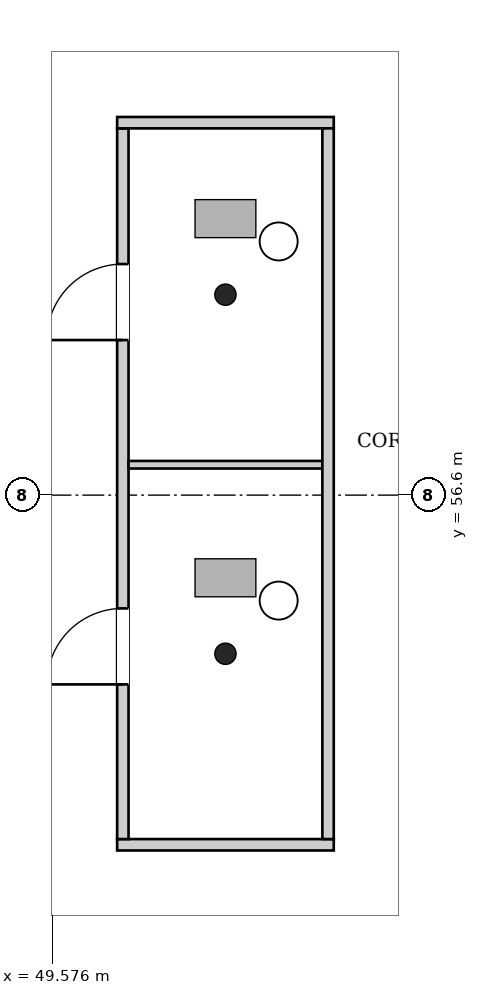
"""IFC4 building model, lengths in metres.
Left out: names, types, materials, properties, quantities, classifications, styles, units other than length and angle.
Written with IfcOpenShell. Run it as: python <this file> out.ifc"""

import sys

from ifc_helpers import new_model, si_unit, direction, frame, frame_2d, origin, place, context, subcontext, project, spatial, rectangle, extrude, element, fill, save


model = new_model("IFC4")
c1 = context("Model", 3, precision=1e-05, world=origin(), true_north=direction((0.0, 1.0)))
c2 = subcontext(c1, "Body", "Model", "MODEL_VIEW")
j1 = project(units=[si_unit("LENGTHUNIT", "METRE"), si_unit("PLANEANGLEUNIT", "RADIAN")], contexts=[c1])
p1 = place(None, origin())
s1 = spatial("IfcSite", under=j1, at=p1, CompositionType="ELEMENT")
p2 = place(p1, origin())
s2 = spatial("IfcBuilding", under=s1, at=p2, CompositionType="ELEMENT")
p3 = place(p2, frame((0.0, 0.0, 14.2)))
s3 = spatial("IfcBuildingStorey", under=s2, at=p3, CompositionType="ELEMENT", Elevation=14.2)
p4 = place(p3, frame((50.425, 52.0, 0.0), z_axis=(0.0, 0.0, 1.0), x_axis=(1.0, 0.0, 0.0)))
e1 = element("IfcWall", 1, at=p4, inside=s3, PredefinedType="PARTITIONING", context=c2, shape_type="SweptSolid", body=[
    extrude(rectangle(XDim=2.85, YDim=0.15, at=frame_2d((1.425, 0.0))), origin(), (0.0, 0.0, 1.0), 7.15),
])
p5 = place(p3, frame((50.5, 52.075, 0.0), z_axis=(0.0, 0.0, 1.0), x_axis=(0.0, 1.0, 0.0)))
e2 = element("IfcWall", 2, at=p5, inside=s3, PredefinedType="PARTITIONING", context=c2, shape_type="SweptSolid", body=[
    extrude(rectangle(XDim=9.35, YDim=0.15, at=frame_2d((4.675, 0.0))), origin(), (0.0, 0.0, 1.0), 7.15),
])
p6 = place(p5, frame((2.035, 0.0, 0.0)))
e3 = element("IfcOpeningElement", 3, at=p6, cuts=e2, PredefinedType="OPENING", context=c2, shape_type="SweptSolid", body=[
    extrude(rectangle(XDim=1.0, YDim=2.1, at=frame_2d((0.5, 1.05))), frame((0.0, 0.085, 0.0), z_axis=(0.0, -1.0, 0.0), x_axis=(1.0, 0.0, 0.0)), (0.0, 0.0, 1.0), 0.17),
])
p7 = place(p5, frame((6.565, 0.0, 0.0)))
e4 = element("IfcOpeningElement", 4, at=p7, cuts=e2, PredefinedType="OPENING", context=c2, shape_type="SweptSolid", body=[
    extrude(rectangle(XDim=1.0, YDim=2.1, at=frame_2d((0.5, 1.05))), frame((0.0, 0.085, 0.0), z_axis=(0.0, -1.0, 0.0), x_axis=(1.0, 0.0, 0.0)), (0.0, 0.0, 1.0), 0.17),
])
p8 = place(p3, frame((50.425, 61.5, 0.0), z_axis=(0.0, 0.0, 1.0), x_axis=(1.0, 0.0, 0.0)))
e5 = element("IfcWall", 5, at=p8, inside=s3, PredefinedType="PARTITIONING", context=c2, shape_type="SweptSolid", body=[
    extrude(rectangle(XDim=2.85, YDim=0.15, at=frame_2d((1.425, 0.0))), origin(), (0.0, 0.0, 1.0), 7.15),
])
p9 = place(p3, frame((50.575, 57.0, 0.0), z_axis=(0.0, 0.0, 1.0), x_axis=(1.0, 0.0, 0.0)))
e6 = element("IfcWall", 6, at=p9, inside=s3, PredefinedType="PARTITIONING", context=c2, shape_type="SweptSolid", body=[
    extrude(rectangle(XDim=2.55, YDim=0.1, at=frame_2d((1.275, 0.0))), origin(), (0.0, 0.0, 1.0), 6.75),
])
p10 = place(p3, frame((53.2, 52.075, 0.0), z_axis=(0.0, 0.0, 1.0), x_axis=(0.0, 1.0, 0.0)))
e7 = element("IfcWall", 7, at=p10, inside=s3, PredefinedType="PARTITIONING", context=c2, shape_type="SweptSolid", body=[
    extrude(rectangle(XDim=9.35, YDim=0.15, at=frame_2d((4.675, 0.0))), origin(), (0.0, 0.0, 1.0), 7.15),
])
p11 = place(p6, origin())
e8 = element("IfcDoor", 8, at=p11, inside=s3, OperationType="SINGLE_SWING_RIGHT", PredefinedType="DOOR", context=c2, shape_type="SweptSolid", body=[
    extrude(rectangle(XDim=1.0, YDim=2.1, at=frame_2d((0.5, 1.05))), frame((0.0, 0.025, 0.0), z_axis=(0.0, -1.0, 0.0), x_axis=(1.0, 0.0, 0.0)), (0.0, 0.0, 1.0), 0.05),
])
fill(e3, e8)
p12 = place(p7, origin())
e9 = element("IfcDoor", 9, at=p12, inside=s3, OperationType="SINGLE_SWING_LEFT", PredefinedType="DOOR", context=c2, shape_type="SweptSolid", body=[
    extrude(rectangle(XDim=1.0, YDim=2.1, at=frame_2d((0.5, 1.05))), frame((0.0, 0.025, 0.0), z_axis=(0.0, -1.0, 0.0), x_axis=(1.0, 0.0, 0.0)), (0.0, 0.0, 1.0), 0.05),
])
fill(e4, e9)
save(model, sys.argv[1])
